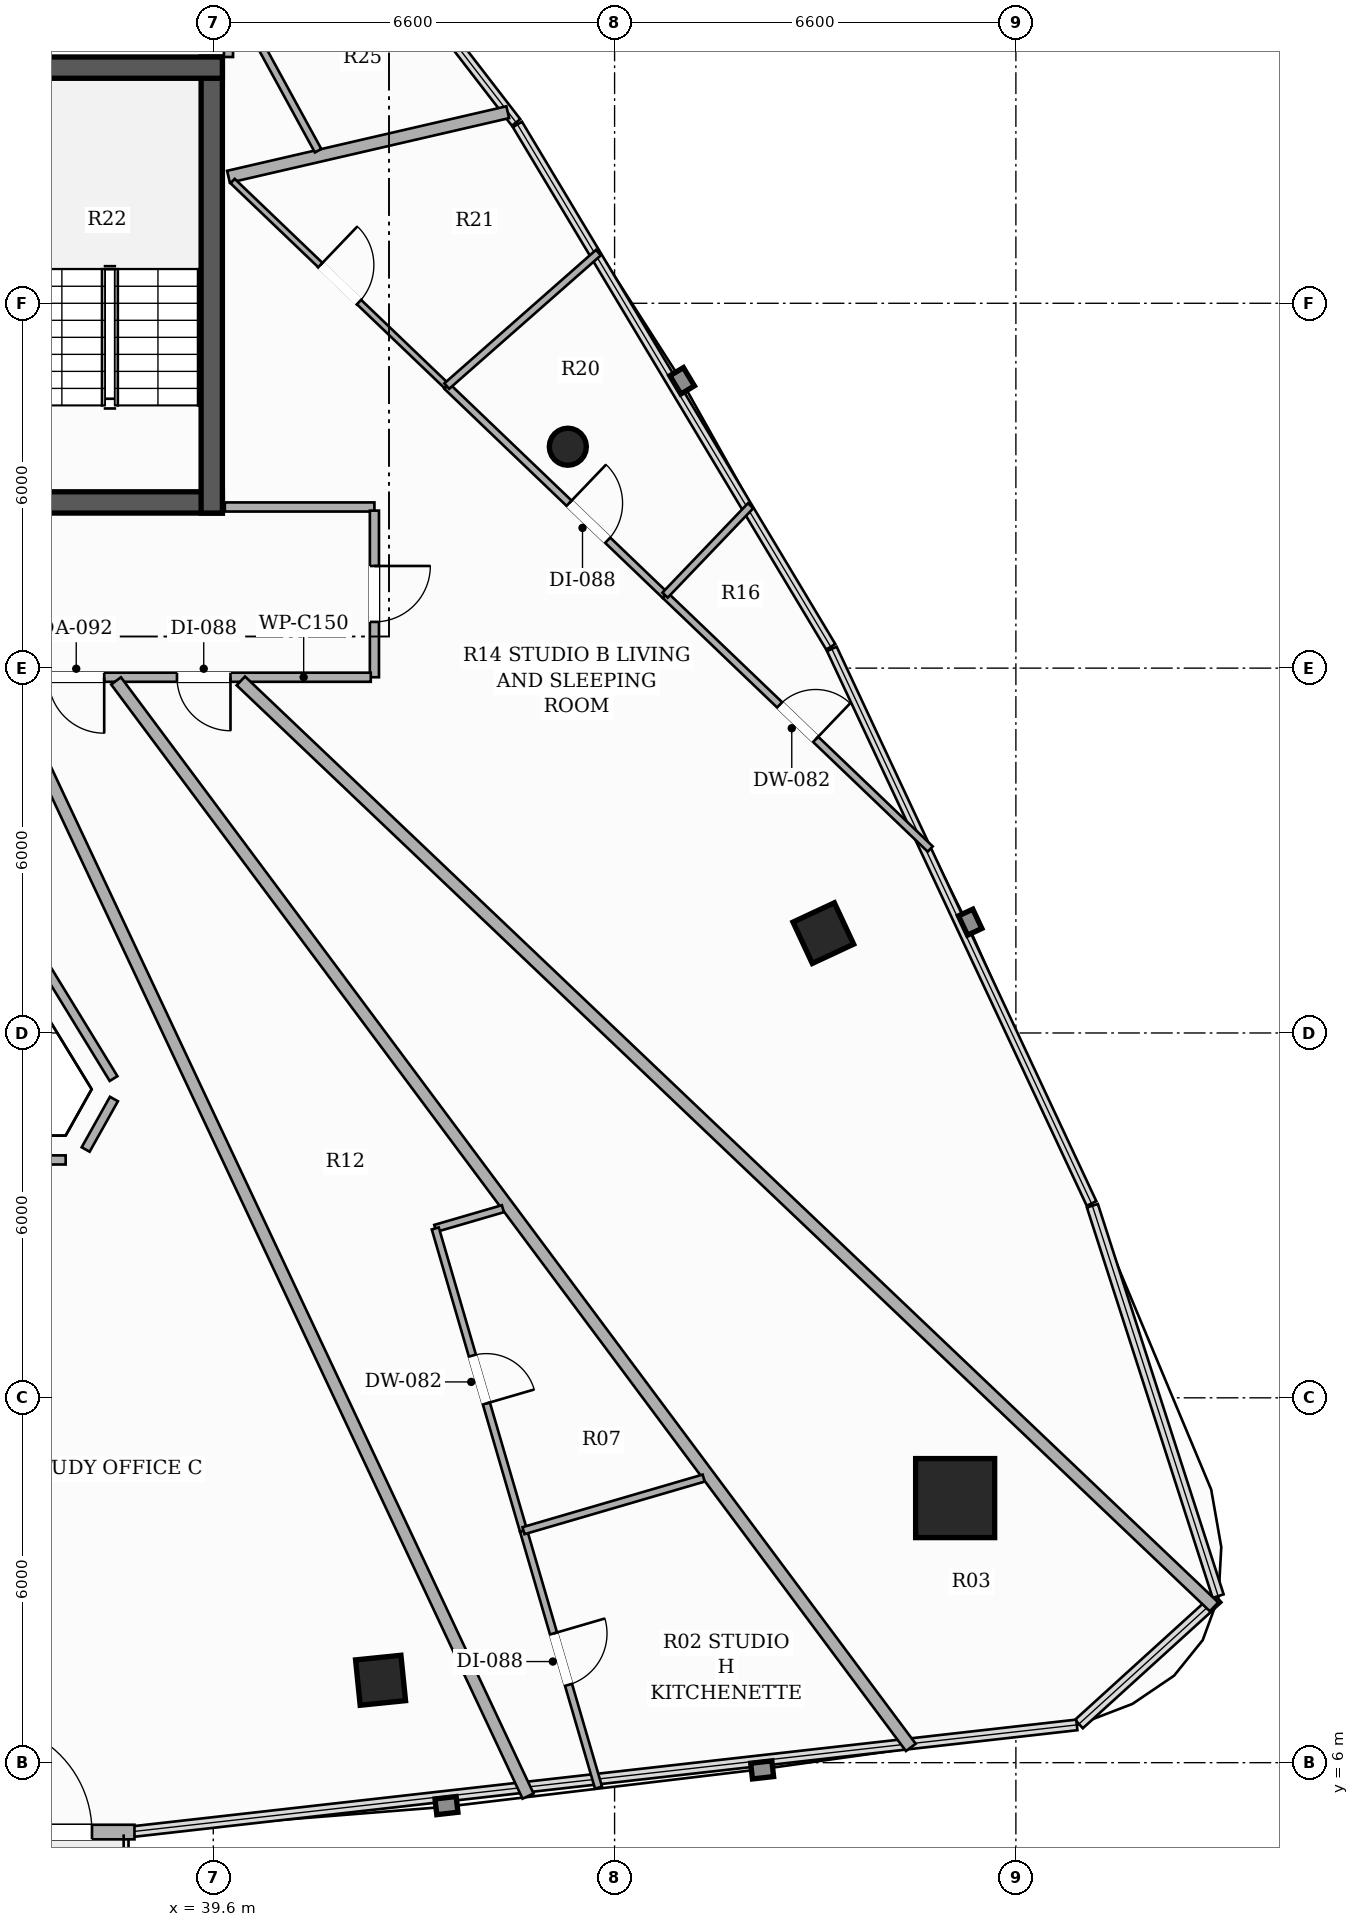
"""IFC4 building model, lengths in metres.
Left out: names, types, materials, properties, quantities, classifications, styles, units other than length and angle.
Written with IfcOpenShell. Run it as: python <this file> out.ifc"""

import sys

from ifc_helpers import new_model, si_unit, direction, frame, frame_2d, origin, origin_2d, place, context, subcontext, project, spatial, rectangle, hollow_rectangle, hollow_circle, extrude, element, fill, save


model = new_model("IFC4")
c1 = context("Model", 3, precision=1e-05, world=origin(), true_north=direction((0.0, 1.0)))
c2 = subcontext(c1, "Body", "Model", "MODEL_VIEW")
j1 = project(units=[si_unit("LENGTHUNIT", "METRE"), si_unit("PLANEANGLEUNIT", "RADIAN")], contexts=[c1])
p1 = place(None, origin())
s1 = spatial("IfcSite", under=j1, at=p1, CompositionType="ELEMENT")
p2 = place(p1, origin())
s2 = spatial("IfcBuilding", under=s1, at=p2, CompositionType="ELEMENT")
p3 = place(p2, frame((0.0, 0.0, 222.8)))
s3 = spatial("IfcBuildingStorey", under=s2, at=p3, CompositionType="ELEMENT", Elevation=222.8)
p4 = place(p3, frame((26.25, 26.725, 0.0), z_axis=(0.0, 0.0, 1.0), x_axis=(1.0, 0.0, 0.0)))
e1 = element("IfcWall", 1, at=p4, inside=s3, PredefinedType="SHEAR", context=c2, shape_type="SweptSolid", body=[
    extrude(rectangle(XDim=13.5, YDim=0.35, at=frame_2d((6.75, 0.0))), origin(), (0.0, 0.0, 1.0), 3.3),
])
p5 = place(p4, frame((4.35, 0.0, 0.0)))
e2 = element("IfcOpeningElement", 2, at=p5, cuts=e1, PredefinedType="OPENING", context=c2, shape_type="SweptSolid", body=[
    extrude(rectangle(XDim=1.05, YDim=2.15, at=frame_2d((0.525, 1.075))), frame((0.0, 0.185, 0.0), z_axis=(0.0, -1.0, 0.0), x_axis=(1.0, 0.0, 0.0)), (0.0, 0.0, 1.0), 0.37),
])
p6 = place(p4, frame((8.3, 0.0, 0.0)))
e3 = element("IfcOpeningElement", 3, at=p6, cuts=e1, PredefinedType="OPENING", context=c2, shape_type="SweptSolid", body=[
    extrude(rectangle(XDim=1.05, YDim=2.15, at=frame_2d((0.525, 1.075))), frame((0.0, 0.185, 0.0), z_axis=(0.0, -1.0, 0.0), x_axis=(1.0, 0.0, 0.0)), (0.0, 0.0, 1.0), 0.37),
])
p7 = place(p3, frame((39.575, 26.55, 0.0), z_axis=(0.0, 0.0, 1.0), x_axis=(0.0, 1.0, 0.0)))
e4 = element("IfcWall", 4, at=p7, inside=s3, PredefinedType="SHEAR", context=c2, shape_type="SweptSolid", body=[
    extrude(rectangle(XDim=7.5, YDim=0.35, at=frame_2d((3.75, 0.0))), origin(), (0.0, 0.0, 1.0), 3.3),
])
p8 = place(p3, frame((36.15, 33.875, 0.0), z_axis=(0.0, 0.0, 1.0), x_axis=(1.0, 0.0, 0.0)))
e5 = element("IfcWall", 5, at=p8, inside=s3, PredefinedType="SHEAR", context=c2, shape_type="SweptSolid", body=[
    extrude(rectangle(XDim=3.6, YDim=0.35, at=frame_2d((1.8, 0.0))), origin(), (0.0, 0.0, 1.0), 3.3),
])
p9 = place(p3, frame((51.801, 10.351, 0.0), z_axis=(0.0, 0.0, 1.0), x_axis=(1.0, 0.0, 0.0)))
e6 = element("IfcColumn", 6, at=p9, inside=s3, PredefinedType="COLUMN", context=c2, shape_type="SweptSolid", body=[
    extrude(hollow_rectangle(XDim=1.3, YDim=1.3, WallThickness=0.04, at=origin_2d()), origin(), (0.0, 0.0, 1.0), 3.3),
])
for number, where, z_axis, x_axis in (
    (7, (42.351, 7.355, 0.0), (0.0, 0.0, 1.0), (0.995, 0.101, 0.0)),
    (8, (49.633, 19.642, 0.0), (0.0, 0.0, 1.0), (-0.423, 0.906, 0.0)),
):
    element("IfcColumn", number, at=place(p3, frame(where, z_axis=z_axis, x_axis=x_axis)), inside=s3, PredefinedType="COLUMN", context=c2, shape_type="SweptSolid", body=[
        extrude(hollow_rectangle(XDim=0.75, YDim=0.75, WallThickness=0.025, at=origin_2d()), origin(), (0.0, 0.0, 1.0), 3.3),
    ])
p10 = place(p3, frame((45.431, 27.641, 0.0), z_axis=(0.0, 0.0, 1.0), x_axis=(1.0, 0.0, 0.0)))
e9 = element("IfcColumn", 9, at=p10, inside=s3, PredefinedType="COLUMN", context=c2, shape_type="SweptSolid", body=[
    extrude(hollow_circle(Radius=0.305, WallThickness=0.016, at=origin_2d()), origin(), (0.0, 0.0, 1.0), 3.3),
])
p11 = place(p3, frame((27.696, 4.859, 0.0), z_axis=(0.0, 0.0, 1.0), x_axis=(1.0, 0.0, 0.0)))
e10 = element("IfcWall", 10, at=p11, inside=s3, PredefinedType="SOLIDWALL", context=c2, shape_type="SweptSolid", body=[
    extrude(rectangle(XDim=10.608, YDim=0.24, at=frame_2d((5.304, 0.0))), origin(), (0.0, 0.0, 1.0), 2.624),
])
p12 = place(p11, frame((8.109, 0.0, 0.0)))
e11 = element("IfcOpeningElement", 11, at=p12, cuts=e10, PredefinedType="OPENING", context=c2, shape_type="SweptSolid", body=[
    extrude(rectangle(XDim=1.8, YDim=2.2, at=frame_2d((0.9, 1.1))), frame((0.0, 0.13, 0.0), z_axis=(0.0, -1.0, 0.0), x_axis=(1.0, 0.0, 0.0)), (0.0, 0.0, 1.0), 0.26),
])
p13 = place(p3, frame((39.79, 26.65, 0.0), z_axis=(0.0, 0.0, 1.0), x_axis=(1.0, 0.0, 0.0)))
e12 = element("IfcWall", 12, at=p13, inside=s3, PredefinedType="PARTITIONING", context=c2, shape_type="SweptSolid", body=[
    extrude(rectangle(XDim=2.46, YDim=0.15, at=frame_2d((1.23, 0.0))), origin(), (0.0, 0.0, 1.0), 2.565),
])
p14 = place(p3, frame((42.25, 26.59, 0.0), z_axis=(0.0, 0.0, 1.0), x_axis=(0.0, -1.0, 0.0)))
e13 = element("IfcWall", 13, at=p14, inside=s3, PredefinedType="PARTITIONING", context=c2, shape_type="SweptSolid", body=[
    extrude(rectangle(XDim=2.74, YDim=0.15, at=frame_2d((1.37, 0.0))), origin(), (0.0, 0.0, 1.0), 2.773),
])
p15 = place(p14, frame((0.91, 0.0, 0.0)))
e14 = element("IfcOpeningElement", 14, at=p15, cuts=e13, PredefinedType="OPENING", context=c2, shape_type="SweptSolid", body=[
    extrude(rectangle(XDim=0.92, YDim=2.15, at=frame_2d((0.46, 1.075))), frame((0.0, 0.085, 0.0), z_axis=(0.0, -1.0, 0.0), x_axis=(1.0, 0.0, 0.0)), (0.0, 0.0, 1.0), 0.17),
])
p16 = place(p3, frame((42.19, 23.85, 0.0), z_axis=(0.0, 0.0, 1.0), x_axis=(-1.0, 0.0, 0.0)))
e15 = element("IfcWall", 15, at=p16, inside=s3, PredefinedType="PARTITIONING", context=c2, shape_type="SweptSolid", body=[
    extrude(rectangle(XDim=8.263, YDim=0.15, at=frame_2d((4.131, 0.0))), origin(), (0.0, 0.0, 1.0), 2.565),
])
p17 = place(p16, frame((6.516, 0.0, 0.0)))
e16 = element("IfcOpeningElement", 16, at=p17, cuts=e15, PredefinedType="OPENING", context=c2, shape_type="SweptSolid", body=[
    extrude(rectangle(XDim=0.88, YDim=2.1, at=frame_2d((0.44, 1.05))), frame((0.0, 0.085, 0.0), z_axis=(0.0, -1.0, 0.0), x_axis=(1.0, 0.0, 0.0)), (0.0, 0.0, 1.0), 0.17),
])
p18 = place(p16, frame((2.307, 0.0, 0.0)))
e17 = element("IfcOpeningElement", 17, at=p18, cuts=e15, PredefinedType="OPENING", context=c2, shape_type="SweptSolid", body=[
    extrude(rectangle(XDim=0.88, YDim=2.1, at=frame_2d((0.44, 1.05))), frame((0.0, 0.085, 0.0), z_axis=(0.0, -1.0, 0.0), x_axis=(1.0, 0.0, 0.0)), (0.0, 0.0, 1.0), 0.17),
])
p19 = place(p16, frame((4.384, 0.0, 0.0)))
e18 = element("IfcOpeningElement", 18, at=p19, cuts=e15, PredefinedType="OPENING", context=c2, shape_type="SweptSolid", body=[
    extrude(rectangle(XDim=0.92, YDim=2.15, at=frame_2d((0.46, 1.075))), frame((0.0, 0.085, 0.0), z_axis=(0.0, -1.0, 0.0), x_axis=(1.0, 0.0, 0.0)), (0.0, 0.0, 1.0), 0.17),
])
p20 = place(p3, frame((39.85, 34.74, 0.0), z_axis=(0.0, 0.0, 1.0), x_axis=(0.0, -1.0, 0.0)))
e19 = element("IfcWall", 19, at=p20, inside=s3, PredefinedType="PARTITIONING", context=c2, shape_type="SweptSolid", body=[
    extrude(rectangle(XDim=0.69, YDim=0.15, at=frame_2d((0.345, 0.0))), origin(), (0.0, 0.0, 1.0), 2.773),
])
p21 = place(p3, frame((33.958, 23.79, 0.0), z_axis=(0.0, 0.0, 1.0), x_axis=(0.521949656317, -0.852976292912, 0.0)))
e20 = element("IfcWall", 20, at=p21, inside=s3, PredefinedType="PARTITIONING", context=c2, shape_type="SweptSolid", body=[
    extrude(rectangle(XDim=7.667, YDim=0.15, at=frame_2d((3.833, 0.0))), origin(), (0.0, 0.0, 1.0), 2.773),
])
p22 = place(p3, frame((37.966, 16.914, 0.0), z_axis=(0.0, 0.0, 1.0), x_axis=(-0.48879868802, -0.872396608539, 0.0)))
e21 = element("IfcWall", 21, at=p22, inside=s3, PredefinedType="PARTITIONING", context=c2, shape_type="SweptSolid", body=[
    extrude(rectangle(XDim=0.951, YDim=0.15, at=frame_2d((0.476, 0.0))), origin(), (0.0, 0.0, 1.0), 3.06),
])
p23 = place(p3, frame((37.172, 15.912, 0.0), z_axis=(0.0, 0.0, 1.0), x_axis=(-1.0, 0.0, 0.0)))
e22 = element("IfcWall", 22, at=p23, inside=s3, PredefinedType="PARTITIONING", context=c2, shape_type="SweptSolid", body=[
    extrude(rectangle(XDim=8.344, YDim=0.15, at=frame_2d((4.172, 0.0))), origin(), (0.0, 0.0, 1.0), 2.773),
])
p24 = place(p3, frame((39.85, 32.081, 0.0), z_axis=(0.0, 0.0, 1.0), x_axis=(0.974339670333, 0.225082666628, 0.0)))
e23 = element("IfcWall", 23, at=p24, inside=s3, PredefinedType="PARTITIONING", context=c2, shape_type="SweptSolid", body=[
    extrude(rectangle(XDim=4.714, YDim=0.2, at=frame_2d((2.357, 0.0))), origin(), (0.0, 0.0, 1.0), 2.492),
])
p25 = place(p3, frame((56.059, 8.563, 0.0), z_axis=(0.0, 0.0, 1.0), x_axis=(-0.724518891706, 0.689254942355, 0.0)))
e24 = element("IfcWall", 24, at=p25, inside=s3, PredefinedType="PARTITIONING", context=c2, shape_type="SweptSolid", body=[
    extrude(rectangle(XDim=22.092, YDim=0.2, at=frame_2d((11.046, 0.0))), origin(), (0.0, 0.0, 1.0), 2.492),
])
p26 = place(p3, frame((36.155, 23.79, 0.0), z_axis=(0.0, 0.0, 1.0), x_axis=(0.425451226132, -0.90498135571, 0.0)))
e25 = element("IfcWall", 25, at=p26, inside=s3, PredefinedType="PARTITIONING", context=c2, shape_type="SweptSolid", body=[
    extrude(rectangle(XDim=20.266, YDim=0.2, at=frame_2d((10.133, 0.0))), origin(), (0.0, 0.0, 1.0), 2.492),
])
p27 = place(p3, frame((51.072, 6.251, 0.0), z_axis=(0.0, 0.0, 1.0), x_axis=(-0.59756139073, 0.801823162742, 0.0)))
e26 = element("IfcWall", 26, at=p27, inside=s3, PredefinedType="PARTITIONING", context=c2, shape_type="SweptSolid", body=[
    extrude(rectangle(XDim=21.874, YDim=0.2, at=frame_2d((10.937, 0.0))), origin(), (0.0, 0.0, 1.0), 2.492),
])
p28 = place(p3, frame((47.03, 25.2, 0.0), z_axis=(0.0, 0.0, 1.0), x_axis=(0.722345830301, -0.691531995968, 0.0)))
e27 = element("IfcWall", 27, at=p28, inside=s3, PredefinedType="PARTITIONING", context=c2, shape_type="SweptSolid", body=[
    extrude(rectangle(XDim=6.037, YDim=0.12, at=frame_2d((3.019, 0.0))), origin(), (0.0, 0.0, 1.0), 2.492),
])
p29 = place(p28, frame((2.609, 0.0, 0.0)))
e28 = element("IfcOpeningElement", 28, at=p29, cuts=e27, PredefinedType="OPENING", context=c2, shape_type="SweptSolid", body=[
    extrude(rectangle(XDim=0.82, YDim=2.1, at=frame_2d((0.41, 1.05))), frame((0.0, 0.07, 0.0), z_axis=(0.0, -1.0, 0.0), x_axis=(1.0, 0.0, 0.0)), (0.0, 0.0, 1.0), 0.14),
])
p30 = place(p3, frame((43.44, 28.638, 0.0), z_axis=(0.0, 0.0, 1.0), x_axis=(0.722240667523, -0.691641827954, 0.0)))
e29 = element("IfcWall", 29, at=p30, inside=s3, PredefinedType="PARTITIONING", context=c2, shape_type="SweptSolid", body=[
    extrude(rectangle(XDim=4.971, YDim=0.12, at=frame_2d((2.485, 0.0))), origin(), (0.0, 0.0, 1.0), 2.492),
])
p31 = place(p30, frame((2.785, 0.0, 0.0)))
e30 = element("IfcOpeningElement", 30, at=p31, cuts=e29, PredefinedType="OPENING", context=c2, shape_type="SweptSolid", body=[
    extrude(rectangle(XDim=0.88, YDim=2.1, at=frame_2d((0.44, 1.05))), frame((0.0, 0.07, 0.0), z_axis=(0.0, -1.0, 0.0), x_axis=(1.0, 0.0, 0.0)), (0.0, 0.0, 1.0), 0.14),
])
p32 = place(p3, frame((39.918, 32.01, 0.0), z_axis=(0.0, 0.0, 1.0), x_axis=(0.722311203135, -0.691568164266, 0.0)))
e31 = element("IfcWall", 31, at=p32, inside=s3, PredefinedType="PARTITIONING", context=c2, shape_type="SweptSolid", body=[
    extrude(rectangle(XDim=4.876, YDim=0.1, at=frame_2d((2.438, 0.0))), origin(), (0.0, 0.0, 1.0), 2.773),
])
p33 = place(p32, frame((1.998, 0.0, 0.0)))
e32 = element("IfcOpeningElement", 32, at=p33, cuts=e31, PredefinedType="OPENING", context=c2, shape_type="SweptSolid", body=[
    extrude(rectangle(XDim=0.88, YDim=2.1, at=frame_2d((0.44, 1.05))), frame((0.0, 0.06, 0.0), z_axis=(0.0, -1.0, 0.0), x_axis=(1.0, 0.0, 0.0)), (0.0, 0.0, 1.0), 0.12),
])
p34 = place(p3, frame((47.03, 25.2, 0.0), z_axis=(0.0, 0.0, 1.0), x_axis=(0.691459612883, 0.722415118717, 0.0)))
e33 = element("IfcWall", 33, at=p34, inside=s3, PredefinedType="PARTITIONING", context=c2, shape_type="SweptSolid", body=[
    extrude(rectangle(XDim=2.035, YDim=0.12, at=frame_2d((1.018, 0.0))), origin(), (0.0, 0.0, 1.0), 2.492),
])
p35 = place(p3, frame((43.44, 28.638, 0.0), z_axis=(0.0, 0.0, 1.0), x_axis=(0.750679989093, 0.66066599275, 0.0)))
e34 = element("IfcWall", 34, at=p35, inside=s3, PredefinedType="PARTITIONING", context=c2, shape_type="SweptSolid", body=[
    extrude(rectangle(XDim=3.323, YDim=0.12, at=frame_2d((1.661, 0.0))), origin(), (0.0, 0.0, 1.0), 2.492),
])
p36 = place(p3, frame((38.357, 37.934, 0.0), z_axis=(0.0, 0.0, 1.0), x_axis=(0.479839410825, -0.877356335715, 0.0)))
e35 = element("IfcWall", 35, at=p36, inside=s3, PredefinedType="PARTITIONING", context=c2, shape_type="SweptSolid", body=[
    extrude(rectangle(XDim=6.183, YDim=0.12, at=frame_2d((3.092, 0.0))), origin(), (0.0, 0.0, 1.0), 2.492),
])
p37 = place(p3, frame((44.363, 15.11, 0.0), z_axis=(0.0, 0.0, 1.0), x_axis=(-0.960030681494, -0.279894784857, 0.0)))
e36 = element("IfcWall", 36, at=p37, inside=s3, PredefinedType="PARTITIONING", context=c2, shape_type="SweptSolid", body=[
    extrude(rectangle(XDim=1.158, YDim=0.12, at=frame_2d((0.579, 0.0))), origin(), (0.0, 0.0, 1.0), 2.773),
])
p38 = place(p3, frame((43.251, 14.786, 0.0), z_axis=(0.0, 0.0, 1.0), x_axis=(0.280190088139, -0.959944537204, 0.0)))
e37 = element("IfcWall", 37, at=p38, inside=s3, PredefinedType="PARTITIONING", context=c2, shape_type="SweptSolid", body=[
    extrude(rectangle(XDim=5.178, YDim=0.12, at=frame_2d((2.589, 0.0))), origin(), (0.0, 0.0, 1.0), 3.06),
])
p39 = place(p38, frame((2.179, 0.0, 0.0)))
e38 = element("IfcOpeningElement", 38, at=p39, cuts=e37, PredefinedType="OPENING", context=c2, shape_type="SweptSolid", body=[
    extrude(rectangle(XDim=0.82, YDim=2.1, at=frame_2d((0.41, 1.05))), frame((0.0, 0.07, 0.0), z_axis=(0.0, -1.0, 0.0), x_axis=(1.0, 0.0, 0.0)), (0.0, 0.0, 1.0), 0.14),
])
p40 = place(p3, frame((44.702, 9.815, 0.0), z_axis=(0.0, 0.0, 1.0), x_axis=(0.28033432121, -0.959902426474, 0.0)))
e39 = element("IfcWall", 39, at=p40, inside=s3, PredefinedType="PARTITIONING", context=c2, shape_type="SweptSolid", body=[
    extrude(rectangle(XDim=4.402, YDim=0.12, at=frame_2d((2.201, 0.0))), origin(), (0.0, 0.0, 1.0), 2.492),
])
p41 = place(p40, frame((1.761, 0.0, 0.0)))
e40 = element("IfcOpeningElement", 40, at=p41, cuts=e39, PredefinedType="OPENING", context=c2, shape_type="SweptSolid", body=[
    extrude(rectangle(XDim=0.88, YDim=2.1, at=frame_2d((0.44, 1.05))), frame((0.0, 0.07, 0.0), z_axis=(0.0, -1.0, 0.0), x_axis=(1.0, 0.0, 0.0)), (0.0, 0.0, 1.0), 0.14),
])
p42 = place(p3, frame((47.665, 10.68, 0.0), z_axis=(0.0, 0.0, 1.0), x_axis=(-0.959935309068, -0.280221702235, 0.0)))
e41 = element("IfcWall", 41, at=p42, inside=s3, PredefinedType="PARTITIONING", context=c2, shape_type="SweptSolid", body=[
    extrude(rectangle(XDim=3.087, YDim=0.12, at=frame_2d((1.543, 0.0))), origin(), (0.0, 0.0, 1.0), 2.773),
])
p43 = place(p12, origin())
e42 = element("IfcDoor", 42, at=p43, inside=s3, OperationType="SINGLE_SWING_LEFT", PredefinedType="DOOR", context=c2, shape_type="SweptSolid", body=[
    extrude(rectangle(XDim=1.8, YDim=2.2, at=frame_2d((0.9, 1.1))), frame((0.0, 0.025, 0.0), z_axis=(0.0, -1.0, 0.0), x_axis=(1.0, 0.0, 0.0)), (0.0, 0.0, 1.0), 0.05),
])
fill(e11, e42)
p44 = place(p15, origin())
e43 = element("IfcDoor", 43, at=p44, inside=s3, OperationType="SINGLE_SWING_LEFT", PredefinedType="DOOR", context=c2, shape_type="SweptSolid", body=[
    extrude(rectangle(XDim=0.92, YDim=2.15, at=frame_2d((0.46, 1.075))), frame((0.0, 0.025, 0.0), z_axis=(0.0, -1.0, 0.0), x_axis=(1.0, 0.0, 0.0)), (0.0, 0.0, 1.0), 0.05),
])
fill(e14, e43)
p45 = place(p29, origin())
e44 = element("IfcDoor", 44, at=p45, inside=s3, OperationType="SINGLE_SWING_RIGHT", PredefinedType="DOOR", context=c2, shape_type="SweptSolid", body=[
    extrude(rectangle(XDim=0.82, YDim=2.1, at=frame_2d((0.41, 1.05))), frame((0.0, 0.025, 0.0), z_axis=(0.0, -1.0, 0.0), x_axis=(1.0, 0.0, 0.0)), (0.0, 0.0, 1.0), 0.05),
])
fill(e28, e44)
p46 = place(p31, origin())
e45 = element("IfcDoor", 45, at=p46, inside=s3, OperationType="SINGLE_SWING_LEFT", PredefinedType="DOOR", context=c2, shape_type="SweptSolid", body=[
    extrude(rectangle(XDim=0.88, YDim=2.1, at=frame_2d((0.44, 1.05))), frame((0.0, 0.025, 0.0), z_axis=(0.0, -1.0, 0.0), x_axis=(1.0, 0.0, 0.0)), (0.0, 0.0, 1.0), 0.05),
])
fill(e30, e45)
p47 = place(p33, origin())
e46 = element("IfcDoor", 46, at=p47, inside=s3, OperationType="SINGLE_SWING_LEFT", PredefinedType="DOOR", context=c2, shape_type="SweptSolid", body=[
    extrude(rectangle(XDim=0.88, YDim=2.1, at=frame_2d((0.44, 1.05))), frame((0.0, 0.025, 0.0), z_axis=(0.0, -1.0, 0.0), x_axis=(1.0, 0.0, 0.0)), (0.0, 0.0, 1.0), 0.05),
])
fill(e32, e46)
p48 = place(p18, origin())
e47 = element("IfcDoor", 47, at=p48, inside=s3, OperationType="SINGLE_SWING_LEFT", PredefinedType="DOOR", context=c2, shape_type="SweptSolid", body=[
    extrude(rectangle(XDim=0.88, YDim=2.1, at=frame_2d((0.44, 1.05))), frame((0.0, 0.025, 0.0), z_axis=(0.0, -1.0, 0.0), x_axis=(1.0, 0.0, 0.0)), (0.0, 0.0, 1.0), 0.05),
])
fill(e17, e47)
p49 = place(p19, origin())
e48 = element("IfcDoor", 48, at=p49, inside=s3, OperationType="SINGLE_SWING_LEFT", PredefinedType="DOOR", context=c2, shape_type="SweptSolid", body=[
    extrude(rectangle(XDim=0.92, YDim=2.15, at=frame_2d((0.46, 1.075))), frame((0.0, 0.025, 0.0), z_axis=(0.0, -1.0, 0.0), x_axis=(1.0, 0.0, 0.0)), (0.0, 0.0, 1.0), 0.05),
])
fill(e18, e48)
p50 = place(p39, origin())
e49 = element("IfcDoor", 49, at=p50, inside=s3, OperationType="SINGLE_SWING_RIGHT", PredefinedType="DOOR", context=c2, shape_type="SweptSolid", body=[
    extrude(rectangle(XDim=0.82, YDim=2.1, at=frame_2d((0.41, 1.05))), frame((0.0, 0.025, 0.0), z_axis=(0.0, -1.0, 0.0), x_axis=(1.0, 0.0, 0.0)), (0.0, 0.0, 1.0), 0.05),
])
fill(e38, e49)
p51 = place(p41, origin())
e50 = element("IfcDoor", 50, at=p51, inside=s3, OperationType="SINGLE_SWING_LEFT", PredefinedType="DOOR", context=c2, shape_type="SweptSolid", body=[
    extrude(rectangle(XDim=0.88, YDim=2.1, at=frame_2d((0.44, 1.05))), frame((0.0, 0.025, 0.0), z_axis=(0.0, -1.0, 0.0), x_axis=(1.0, 0.0, 0.0)), (0.0, 0.0, 1.0), 0.05),
])
fill(e40, e50)
save(model, sys.argv[1])
